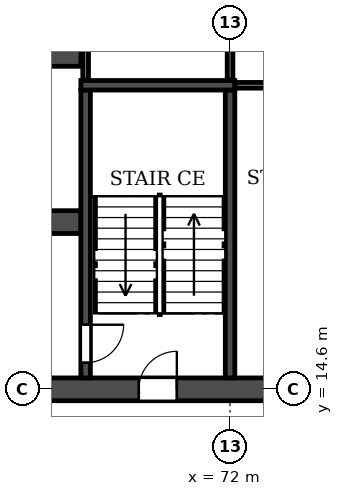
"""IFC4 building model, lengths in metres.
Left out: names, types, materials, properties, quantities, classifications, styles, units other than length and angle.
Written with IfcOpenShell. Run it as: python <this file> out.ifc"""

import sys

from ifc_helpers import new_model, si_unit, direction, frame, frame_2d, origin, place, context, subcontext, project, spatial, rectangle, extrude, element, fill, save


model = new_model("IFC4")
c1 = context("Model", 3, precision=1e-05, world=origin(), true_north=direction((0.0, 1.0)))
c2 = subcontext(c1, "Body", "Model", "MODEL_VIEW")
j1 = project(units=[si_unit("LENGTHUNIT", "METRE"), si_unit("PLANEANGLEUNIT", "RADIAN")], contexts=[c1])
p1 = place(None, origin())
s1 = spatial("IfcSite", under=j1, at=p1, CompositionType="ELEMENT")
p2 = place(p1, origin())
s2 = spatial("IfcBuilding", under=s1, at=p2, CompositionType="ELEMENT")
p3 = place(p2, frame((0.0, 0.0, 53.1)))
s3 = spatial("IfcBuildingStorey", under=s2, at=p3, CompositionType="ELEMENT", Elevation=53.1)
p4 = place(p3, frame((8.6, 14.6, 0.0), z_axis=(0.0, 0.0, 1.0), x_axis=(1.0, 0.0, 0.0)))
e1 = element("IfcWall", 1, at=p4, inside=s3, PredefinedType="SOLIDWALL", context=c2, shape_type="SweptSolid", body=[
    extrude(rectangle(XDim=84.8, YDim=0.6, at=frame_2d((42.4, 0.0))), origin(), (0.0, 0.0, 1.0), 3.05),
])
p5 = place(p4, frame((6.6, 0.0, 0.0)))
e2 = element("IfcOpeningElement", 2, at=p5, cuts=e1, PredefinedType="OPENING", context=c2, shape_type="SweptSolid", body=[
    extrude(rectangle(XDim=0.9, YDim=2.1, at=frame_2d((0.45, 1.05))), frame((0.0, 0.31, 0.0), z_axis=(0.0, -1.0, 0.0), x_axis=(1.0, 0.0, 0.0)), (0.0, 0.0, 1.0), 0.62),
])
p6 = place(p4, frame((10.3, 0.0, 0.0)))
e3 = element("IfcOpeningElement", 3, at=p6, cuts=e1, PredefinedType="OPENING", context=c2, shape_type="SweptSolid", body=[
    extrude(rectangle(XDim=1.0, YDim=2.1, at=frame_2d((0.5, 1.05))), frame((0.0, 0.31, 0.0), z_axis=(0.0, -1.0, 0.0), x_axis=(1.0, 0.0, 0.0)), (0.0, 0.0, 1.0), 0.62),
])
p7 = place(p4, frame((18.25, 0.0, 0.0)))
e4 = element("IfcOpeningElement", 4, at=p7, cuts=e1, PredefinedType="OPENING", context=c2, shape_type="SweptSolid", body=[
    extrude(rectangle(XDim=0.9, YDim=2.1, at=frame_2d((0.45, 1.05))), frame((0.0, 0.31, 0.0), z_axis=(0.0, -1.0, 0.0), x_axis=(1.0, 0.0, 0.0)), (0.0, 0.0, 1.0), 0.62),
])
p8 = place(p4, frame((22.8, 0.0, 0.0)))
e5 = element("IfcOpeningElement", 5, at=p8, cuts=e1, PredefinedType="OPENING", context=c2, shape_type="SweptSolid", body=[
    extrude(rectangle(XDim=1.0, YDim=2.1, at=frame_2d((0.5, 1.05))), frame((0.0, 0.31, 0.0), z_axis=(0.0, -1.0, 0.0), x_axis=(1.0, 0.0, 0.0)), (0.0, 0.0, 1.0), 0.62),
])
p9 = place(p4, frame((34.1, 0.0, 0.0)))
e6 = element("IfcOpeningElement", 6, at=p9, cuts=e1, PredefinedType="OPENING", context=c2, shape_type="SweptSolid", body=[
    extrude(rectangle(XDim=1.0, YDim=2.1, at=frame_2d((0.5, 1.05))), frame((0.0, 0.31, 0.0), z_axis=(0.0, -1.0, 0.0), x_axis=(1.0, 0.0, 0.0)), (0.0, 0.0, 1.0), 0.62),
])
p10 = place(p4, frame((38.0, 0.0, 0.0)))
e7 = element("IfcOpeningElement", 7, at=p10, cuts=e1, PredefinedType="OPENING", context=c2, shape_type="SweptSolid", body=[
    extrude(rectangle(XDim=1.0, YDim=2.1, at=frame_2d((0.5, 1.05))), frame((0.0, 0.31, 0.0), z_axis=(0.0, -1.0, 0.0), x_axis=(1.0, 0.0, 0.0)), (0.0, 0.0, 1.0), 0.62),
])
p11 = place(p4, frame((41.9, 0.0, 0.0)))
e8 = element("IfcOpeningElement", 8, at=p11, cuts=e1, PredefinedType="OPENING", context=c2, shape_type="SweptSolid", body=[
    extrude(rectangle(XDim=1.0, YDim=2.1, at=frame_2d((0.5, 1.05))), frame((0.0, 0.31, 0.0), z_axis=(0.0, -1.0, 0.0), x_axis=(1.0, 0.0, 0.0)), (0.0, 0.0, 1.0), 0.62),
])
p12 = place(p4, frame((45.8, 0.0, 0.0)))
e9 = element("IfcOpeningElement", 9, at=p12, cuts=e1, PredefinedType="OPENING", context=c2, shape_type="SweptSolid", body=[
    extrude(rectangle(XDim=1.0, YDim=2.1, at=frame_2d((0.5, 1.05))), frame((0.0, 0.31, 0.0), z_axis=(0.0, -1.0, 0.0), x_axis=(1.0, 0.0, 0.0)), (0.0, 0.0, 1.0), 0.62),
])
p13 = place(p4, frame((49.7, 0.0, 0.0)))
e10 = element("IfcOpeningElement", 10, at=p13, cuts=e1, PredefinedType="OPENING", context=c2, shape_type="SweptSolid", body=[
    extrude(rectangle(XDim=1.0, YDim=2.1, at=frame_2d((0.5, 1.05))), frame((0.0, 0.31, 0.0), z_axis=(0.0, -1.0, 0.0), x_axis=(1.0, 0.0, 0.0)), (0.0, 0.0, 1.0), 0.62),
])
p14 = place(p4, frame((61.0, 0.0, 0.0)))
e11 = element("IfcOpeningElement", 11, at=p14, cuts=e1, PredefinedType="OPENING", context=c2, shape_type="SweptSolid", body=[
    extrude(rectangle(XDim=1.0, YDim=2.1, at=frame_2d((0.5, 1.05))), frame((0.0, 0.31, 0.0), z_axis=(0.0, -1.0, 0.0), x_axis=(1.0, 0.0, 0.0)), (0.0, 0.0, 1.0), 0.62),
])
p15 = place(p4, frame((65.65, 0.0, 0.0)))
e12 = element("IfcOpeningElement", 12, at=p15, cuts=e1, PredefinedType="OPENING", context=c2, shape_type="SweptSolid", body=[
    extrude(rectangle(XDim=0.9, YDim=2.1, at=frame_2d((0.45, 1.05))), frame((0.0, 0.31, 0.0), z_axis=(0.0, -1.0, 0.0), x_axis=(1.0, 0.0, 0.0)), (0.0, 0.0, 1.0), 0.62),
])
p16 = place(p4, frame((73.5, 0.0, 0.0)))
e13 = element("IfcOpeningElement", 13, at=p16, cuts=e1, PredefinedType="OPENING", context=c2, shape_type="SweptSolid", body=[
    extrude(rectangle(XDim=1.0, YDim=2.1, at=frame_2d((0.5, 1.05))), frame((0.0, 0.31, 0.0), z_axis=(0.0, -1.0, 0.0), x_axis=(1.0, 0.0, 0.0)), (0.0, 0.0, 1.0), 0.62),
])
p17 = place(p4, frame((77.3, 0.0, 0.0)))
e14 = element("IfcOpeningElement", 14, at=p17, cuts=e1, PredefinedType="OPENING", context=c2, shape_type="SweptSolid", body=[
    extrude(rectangle(XDim=0.9, YDim=2.1, at=frame_2d((0.45, 1.05))), frame((0.0, 0.31, 0.0), z_axis=(0.0, -1.0, 0.0), x_axis=(1.0, 0.0, 0.0)), (0.0, 0.0, 1.0), 0.62),
])
p18 = place(p3, frame((33.925, 19.0, 0.0), z_axis=(0.0, 0.0, 1.0), x_axis=(1.0, 0.0, 0.0)))
e15 = element("IfcWall", 15, at=p18, inside=s3, PredefinedType="SOLIDWALL", context=c2, shape_type="SweptSolid", body=[
    extrude(rectangle(XDim=34.15, YDim=0.6, at=frame_2d((17.075, 0.0))), origin(), (0.0, 0.0, 1.0), 3.05),
])
p19 = place(p18, frame((16.175, 0.0, 0.0)))
e16 = element("IfcOpeningElement", 16, at=p19, cuts=e15, PredefinedType="OPENING", context=c2, shape_type="SweptSolid", body=[
    extrude(rectangle(XDim=1.8, YDim=2.1, at=frame_2d((0.9, 1.05))), frame((0.0, 0.31, 0.0), z_axis=(0.0, -1.0, 0.0), x_axis=(1.0, 0.0, 0.0)), (0.0, 0.0, 1.0), 0.62),
])
p20 = place(p18, frame((1.525, 0.0, 0.0)))
e17 = element("IfcOpeningElement", 17, at=p20, cuts=e15, PredefinedType="OPENING", context=c2, shape_type="SweptSolid", body=[
    extrude(rectangle(XDim=1.8, YDim=2.1, at=frame_2d((0.9, 1.05))), frame((0.0, 0.31, 0.0), z_axis=(0.0, -1.0, 0.0), x_axis=(1.0, 0.0, 0.0)), (0.0, 0.0, 1.0), 0.62),
])
p21 = place(p18, frame((8.725, 0.0, 0.0)))
e18 = element("IfcOpeningElement", 18, at=p21, cuts=e15, PredefinedType="OPENING", context=c2, shape_type="SweptSolid", body=[
    extrude(rectangle(XDim=1.1, YDim=2.1, at=frame_2d((0.55, 1.05))), frame((0.0, 0.31, 0.0), z_axis=(0.0, -1.0, 0.0), x_axis=(1.0, 0.0, 0.0)), (0.0, 0.0, 1.0), 0.62),
])
p22 = place(p18, frame((11.325, 0.0, 0.0)))
e19 = element("IfcOpeningElement", 19, at=p22, cuts=e15, PredefinedType="OPENING", context=c2, shape_type="SweptSolid", body=[
    extrude(rectangle(XDim=1.1, YDim=2.1, at=frame_2d((0.55, 1.05))), frame((0.0, 0.31, 0.0), z_axis=(0.0, -1.0, 0.0), x_axis=(1.0, 0.0, 0.0)), (0.0, 0.0, 1.0), 0.62),
])
p23 = place(p18, frame((13.925, 0.0, 0.0)))
e20 = element("IfcOpeningElement", 20, at=p23, cuts=e15, PredefinedType="OPENING", context=c2, shape_type="SweptSolid", body=[
    extrude(rectangle(XDim=1.1, YDim=2.1, at=frame_2d((0.55, 1.05))), frame((0.0, 0.31, 0.0), z_axis=(0.0, -1.0, 0.0), x_axis=(1.0, 0.0, 0.0)), (0.0, 0.0, 1.0), 0.62),
])
p24 = place(p18, frame((19.125, 0.0, 0.0)))
e21 = element("IfcOpeningElement", 21, at=p24, cuts=e15, PredefinedType="OPENING", context=c2, shape_type="SweptSolid", body=[
    extrude(rectangle(XDim=1.1, YDim=2.1, at=frame_2d((0.55, 1.05))), frame((0.0, 0.31, 0.0), z_axis=(0.0, -1.0, 0.0), x_axis=(1.0, 0.0, 0.0)), (0.0, 0.0, 1.0), 0.62),
])
p25 = place(p18, frame((21.725, 0.0, 0.0)))
e22 = element("IfcOpeningElement", 22, at=p25, cuts=e15, PredefinedType="OPENING", context=c2, shape_type="SweptSolid", body=[
    extrude(rectangle(XDim=1.1, YDim=2.1, at=frame_2d((0.55, 1.05))), frame((0.0, 0.31, 0.0), z_axis=(0.0, -1.0, 0.0), x_axis=(1.0, 0.0, 0.0)), (0.0, 0.0, 1.0), 0.62),
])
p26 = place(p18, frame((24.325, 0.0, 0.0)))
e23 = element("IfcOpeningElement", 23, at=p26, cuts=e15, PredefinedType="OPENING", context=c2, shape_type="SweptSolid", body=[
    extrude(rectangle(XDim=1.1, YDim=2.1, at=frame_2d((0.55, 1.05))), frame((0.0, 0.31, 0.0), z_axis=(0.0, -1.0, 0.0), x_axis=(1.0, 0.0, 0.0)), (0.0, 0.0, 1.0), 0.62),
])
p27 = place(p18, frame((30.825, 0.0, 0.0)))
e24 = element("IfcOpeningElement", 24, at=p27, cuts=e15, PredefinedType="OPENING", context=c2, shape_type="SweptSolid", body=[
    extrude(rectangle(XDim=1.8, YDim=2.1, at=frame_2d((0.9, 1.05))), frame((0.0, 0.31, 0.0), z_axis=(0.0, -1.0, 0.0), x_axis=(1.0, 0.0, 0.0)), (0.0, 0.0, 1.0), 0.62),
])
p28 = place(p3, frame((33.925, 23.4, 0.0), z_axis=(0.0, 0.0, 1.0), x_axis=(1.0, 0.0, 0.0)))
e25 = element("IfcWall", 25, at=p28, inside=s3, PredefinedType="SOLIDWALL", context=c2, shape_type="SweptSolid", body=[
    extrude(rectangle(XDim=34.15, YDim=0.6, at=frame_2d((17.075, 0.0))), origin(), (0.0, 0.0, 1.0), 3.05),
])
p29 = place(p28, frame((16.175, 0.0, 0.0)))
e26 = element("IfcOpeningElement", 26, at=p29, cuts=e25, PredefinedType="OPENING", context=c2, shape_type="SweptSolid", body=[
    extrude(rectangle(XDim=1.8, YDim=2.1, at=frame_2d((0.9, 1.05))), frame((0.0, 0.31, 0.0), z_axis=(0.0, -1.0, 0.0), x_axis=(1.0, 0.0, 0.0)), (0.0, 0.0, 1.0), 0.62),
])
p30 = place(p28, frame((11.025, 0.0, 0.0)))
e27 = element("IfcOpeningElement", 27, at=p30, cuts=e25, PredefinedType="OPENING", context=c2, shape_type="SweptSolid", body=[
    extrude(rectangle(XDim=1.1, YDim=2.1, at=frame_2d((0.55, 1.05))), frame((0.0, 0.31, 0.0), z_axis=(0.0, -1.0, 0.0), x_axis=(1.0, 0.0, 0.0)), (0.0, 0.0, 1.0), 0.62),
])
p31 = place(p3, frame((68.2, 14.9, 0.0), z_axis=(0.0, 0.0, 1.0), x_axis=(0.0, 1.0, 0.0)))
e28 = element("IfcWall", 28, at=p31, inside=s3, PredefinedType="SOLIDWALL", context=c2, shape_type="SweptSolid", body=[
    extrude(rectangle(XDim=7.575, YDim=0.25, at=frame_2d((3.788, 0.0))), origin(), (0.0, 0.0, 1.0), 3.05),
])
p32 = place(p31, frame((0.4, 0.0, 0.0)))
e29 = element("IfcOpeningElement", 29, at=p32, cuts=e28, PredefinedType="OPENING", context=c2, shape_type="SweptSolid", body=[
    extrude(rectangle(XDim=1.0, YDim=2.1, at=frame_2d((0.5, 1.05))), frame((0.0, 0.135, 0.0), z_axis=(0.0, -1.0, 0.0), x_axis=(1.0, 0.0, 0.0)), (0.0, 0.0, 1.0), 0.27),
])
p33 = place(p3, frame((72.0, 14.9, 0.0), z_axis=(0.0, 0.0, 1.0), x_axis=(0.0, 1.0, 0.0)))
e30 = element("IfcWall", 30, at=p33, inside=s3, PredefinedType="SOLIDWALL", context=c2, shape_type="SweptSolid", body=[
    extrude(rectangle(XDim=7.575, YDim=0.25, at=frame_2d((3.788, 0.0))), origin(), (0.0, 0.0, 1.0), 3.05),
])
p34 = place(p3, frame((68.075, 22.6, 0.0), z_axis=(0.0, 0.0, 1.0), x_axis=(1.0, 0.0, 0.0)))
e31 = element("IfcWall", 31, at=p34, inside=s3, PredefinedType="SOLIDWALL", context=c2, shape_type="SweptSolid", body=[
    extrude(rectangle(XDim=4.05, YDim=0.25, at=frame_2d((2.025, 0.0))), origin(), (0.0, 0.0, 1.0), 3.05),
])
p35 = place(p3, frame((72.135, 22.6, 0.0), z_axis=(0.0, 0.0, 1.0), x_axis=(1.0, 0.0, 0.0)))
e32 = element("IfcWall", 32, at=p35, inside=s3, PredefinedType="PARTITIONING", context=c2, shape_type="SweptSolid", body=[
    extrude(rectangle(XDim=5.13, YDim=0.15, at=frame_2d((2.565, 0.0))), origin(), (0.0, 0.0, 1.0), 3.05),
])
for number, where, z_axis, x_axis in (
    (33, (68.2, 22.735, 0.0), (0.0, 0.0, 1.0), (0.0, 1.0, 0.0)),
    (34, (72.0, 22.735, 0.0), (0.0, 0.0, 1.0), (0.0, 1.0, 0.0)),
):
    element("IfcWall", number, at=place(p3, frame(where, z_axis=z_axis, x_axis=x_axis)), inside=s3, PredefinedType="PARTITIONING", context=c2, shape_type="SweptSolid", body=[
        extrude(rectangle(XDim=4.755, YDim=0.15, at=frame_2d((2.377, 0.0))), origin(), (0.0, 0.0, 1.0), 3.05),
    ])
p36 = place(p14, origin())
e35 = element("IfcDoor", 35, at=p36, inside=s3, OperationType="SINGLE_SWING_RIGHT", PredefinedType="DOOR", context=c2, shape_type="SweptSolid", body=[
    extrude(rectangle(XDim=1.0, YDim=2.1, at=frame_2d((0.5, 1.05))), frame((0.0, 0.025, 0.0), z_axis=(0.0, -1.0, 0.0), x_axis=(1.0, 0.0, 0.0)), (0.0, 0.0, 1.0), 0.05),
])
fill(e11, e35)
p37 = place(p32, frame((1.0, 0.0, 0.0), z_axis=(0.0, 0.0, 1.0), x_axis=(-1.0, 0.0, 0.0)))
e36 = element("IfcDoor", 36, at=p37, inside=s3, OperationType="SINGLE_SWING_LEFT", PredefinedType="DOOR", context=c2, shape_type="SweptSolid", body=[
    extrude(rectangle(XDim=1.0, YDim=2.1, at=frame_2d((0.5, 1.05))), frame((0.0, 0.025, 0.0), z_axis=(0.0, -1.0, 0.0), x_axis=(1.0, 0.0, 0.0)), (0.0, 0.0, 1.0), 0.05),
])
fill(e29, e36)
save(model, sys.argv[1])
